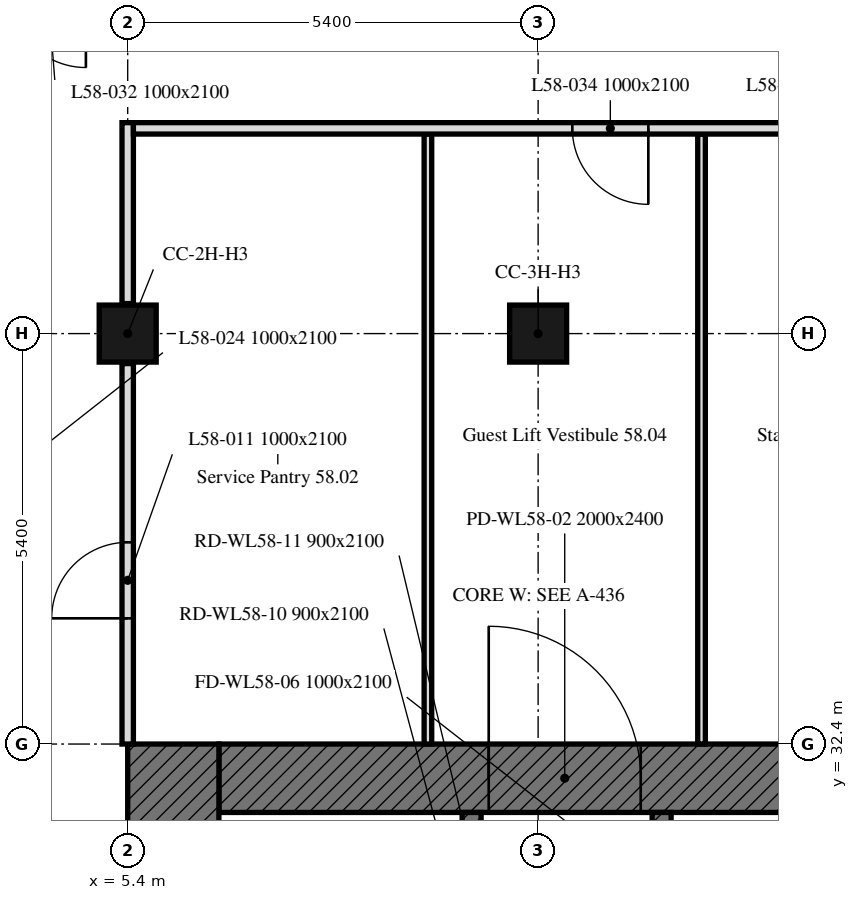
"""IFC4 building model, lengths in metres.
Left out: names, types, materials, properties, quantities, classifications, styles, units other than length and angle.
Written with IfcOpenShell. Run it as: python <this file> out.ifc"""

import sys

from ifc_helpers import new_model, si_unit, direction, frame, frame_2d, origin, origin_2d, place, context, subcontext, project, spatial, rectangle, extrude, element, fill, save


model = new_model("IFC4")
c1 = context("Model", 3, precision=1e-05, world=origin(), true_north=direction((0.0, 1.0)))
c2 = subcontext(c1, "Body", "Model", "MODEL_VIEW")
j1 = project(units=[si_unit("LENGTHUNIT", "METRE"), si_unit("PLANEANGLEUNIT", "RADIAN")], contexts=[c1])
p1 = place(None, origin())
s1 = spatial("IfcSite", under=j1, at=p1, CompositionType="ELEMENT")
p2 = place(p1, origin())
s2 = spatial("IfcBuilding", under=s1, at=p2, CompositionType="ELEMENT")
p3 = place(p2, frame((0.0, 0.0, 230.2)))
s3 = spatial("IfcBuildingStorey", under=s2, at=p3, CompositionType="ELEMENT", Elevation=230.2)
for number, where, z_axis, x_axis in (
    (1, (5.4, 37.8, 0.0), (0.0, 0.0, 1.0), (1.0, 0.0, 0.0)),
    (2, (10.8, 37.8, 0.0), (0.0, 0.0, 1.0), (1.0, 0.0, 0.0)),
):
    element("IfcColumn", number, at=place(p3, frame(where, z_axis=z_axis, x_axis=x_axis)), inside=s3, PredefinedType="COLUMN", context=c2, shape_type="SweptSolid", body=[
        extrude(rectangle(XDim=0.75, YDim=0.75, at=origin_2d()), origin(), (0.0, 0.0, 1.0), 2.8),
    ])
p4 = place(p3, frame((6.6, 31.95, 0.0), z_axis=(0.0, 0.0, 1.0), x_axis=(1.0, 0.0, 0.0)))
e3 = element("IfcWall", 3, at=p4, inside=s3, PredefinedType="SOLIDWALL", context=c2, shape_type="SweptSolid", body=[
    extrude(rectangle(XDim=11.1, YDim=0.9, at=frame_2d((5.55, 0.0))), origin(), (0.0, 0.0, 1.0), 2.8),
])
p5 = place(p4, frame((3.55, 0.0, 0.0)))
e4 = element("IfcOpeningElement", 4, at=p5, cuts=e3, PredefinedType="OPENING", context=c2, shape_type="SweptSolid", body=[
    extrude(rectangle(XDim=2.0, YDim=2.4, at=frame_2d((1.0, 1.2))), frame((0.0, 0.45, 0.0), z_axis=(0.0, -1.0, 0.0), x_axis=(1.0, 0.0, 0.0)), (0.0, 0.0, 1.0), 0.9),
])
p6 = place(p3, frame((6.0, 16.2, 0.0), z_axis=(0.0, 0.0, 1.0), x_axis=(0.0, 1.0, 0.0)))
e5 = element("IfcWall", 5, at=p6, inside=s3, PredefinedType="SOLIDWALL", context=c2, shape_type="SweptSolid", body=[
    extrude(rectangle(XDim=16.2, YDim=1.2, at=frame_2d((8.1, 0.0))), origin(), (0.0, 0.0, 1.0), 2.8),
])
p7 = place(p3, frame((9.925, 17.1, 0.0), z_axis=(0.0, 0.0, 1.0), x_axis=(0.0, 1.0, 0.0)))
e6 = element("IfcWall", 6, at=p7, inside=s3, PredefinedType="SOLIDWALL", context=c2, shape_type="SweptSolid", body=[
    extrude(rectangle(XDim=14.4, YDim=0.25, at=frame_2d((7.2, 0.0))), origin(), (0.0, 0.0, 1.0), 2.8),
])
p8 = place(p7, frame((4.6, 0.0, 0.0)))
e7 = element("IfcOpeningElement", 7, at=p8, cuts=e6, PredefinedType="OPENING", context=c2, shape_type="SweptSolid", body=[
    extrude(rectangle(XDim=1.0, YDim=2.1, at=frame_2d((0.5, 1.05))), frame((0.0, 0.125, 0.0), z_axis=(0.0, -1.0, 0.0), x_axis=(1.0, 0.0, 0.0)), (0.0, 0.0, 1.0), 0.25),
])
p9 = place(p7, frame((7.062, 0.0, 0.0)))
e8 = element("IfcOpeningElement", 8, at=p9, cuts=e6, PredefinedType="OPENING", context=c2, shape_type="SweptSolid", body=[
    extrude(rectangle(XDim=1.2, YDim=2.1, at=frame_2d((0.6, 1.05))), frame((0.0, 0.125, 0.0), z_axis=(0.0, -1.0, 0.0), x_axis=(1.0, 0.0, 0.0)), (0.0, 0.0, 1.0), 0.25),
])
p10 = place(p7, frame((10.106, 0.0, 0.0)))
e9 = element("IfcOpeningElement", 9, at=p10, cuts=e6, PredefinedType="OPENING", context=c2, shape_type="SweptSolid", body=[
    extrude(rectangle(XDim=0.9, YDim=2.1, at=frame_2d((0.45, 1.05))), frame((0.0, 0.125, 0.0), z_axis=(0.0, -1.0, 0.0), x_axis=(1.0, 0.0, 0.0)), (0.0, 0.0, 1.0), 0.25),
])
p11 = place(p7, frame((12.048, 0.0, 0.0)))
e10 = element("IfcOpeningElement", 10, at=p11, cuts=e6, PredefinedType="OPENING", context=c2, shape_type="SweptSolid", body=[
    extrude(rectangle(XDim=0.9, YDim=2.1, at=frame_2d((0.45, 1.05))), frame((0.0, 0.125, 0.0), z_axis=(0.0, -1.0, 0.0), x_axis=(1.0, 0.0, 0.0)), (0.0, 0.0, 1.0), 0.25),
])
p12 = place(p7, frame((13.354, 0.0, 0.0)))
e11 = element("IfcOpeningElement", 11, at=p12, cuts=e6, PredefinedType="OPENING", context=c2, shape_type="SweptSolid", body=[
    extrude(rectangle(XDim=0.9, YDim=2.1, at=frame_2d((0.45, 1.05))), frame((0.0, 0.125, 0.0), z_axis=(0.0, -1.0, 0.0), x_axis=(1.0, 0.0, 0.0)), (0.0, 0.0, 1.0), 0.25),
])
p13 = place(p3, frame((12.425, 29.4, 0.0), z_axis=(0.0, 0.0, 1.0), x_axis=(0.0, 1.0, 0.0)))
e12 = element("IfcWall", 12, at=p13, inside=s3, PredefinedType="SOLIDWALL", context=c2, shape_type="SweptSolid", body=[
    extrude(rectangle(XDim=2.1, YDim=0.25, at=frame_2d((1.05, 0.0))), origin(), (0.0, 0.0, 1.0), 2.8),
])
p14 = place(p13, frame((0.5, 0.0, 0.0)))
e13 = element("IfcOpeningElement", 13, at=p14, cuts=e12, PredefinedType="OPENING", context=c2, shape_type="SweptSolid", body=[
    extrude(rectangle(XDim=1.0, YDim=2.1, at=frame_2d((0.5, 1.05))), frame((0.0, 0.125, 0.0), z_axis=(0.0, -1.0, 0.0), x_axis=(1.0, 0.0, 0.0)), (0.0, 0.0, 1.0), 0.25),
])
for number, where, z_axis, x_axis in (
    (14, (12.95, 32.4, 0.0), (0.0, 0.0, 1.0), (0.0, 1.0, 0.0)),
    (15, (9.35, 40.425, 0.0), (0.0, 0.0, 1.0), (0.0, -1.0, 0.0)),
):
    element("IfcWall", number, at=place(p3, frame(where, z_axis=z_axis, x_axis=x_axis)), inside=s3, PredefinedType="PARTITIONING", context=c2, shape_type="SweptSolid", body=[
        extrude(rectangle(XDim=8.025, YDim=0.1, at=frame_2d((4.013, 0.0))), origin(), (0.0, 0.0, 1.0), 2.2),
    ])
p15 = place(p3, frame((5.4, 32.4, 0.0), z_axis=(0.0, 0.0, 1.0), x_axis=(0.0, 1.0, 0.0)))
e16 = element("IfcWall", 16, at=p15, inside=s3, PredefinedType="PARTITIONING", context=c2, shape_type="SweptSolid", body=[
    extrude(rectangle(XDim=5.005, YDim=0.15, at=frame_2d((2.502, 0.0))), origin(), (0.0, 0.0, 1.0), 2.8),
])
p16 = place(p15, frame((1.654, 0.0, 0.0)))
e17 = element("IfcOpeningElement", 17, at=p16, cuts=e16, PredefinedType="OPENING", context=c2, shape_type="SweptSolid", body=[
    extrude(rectangle(XDim=1.0, YDim=2.1, at=frame_2d((0.5, 1.05))), frame((0.0, 0.075, 0.0), z_axis=(0.0, -1.0, 0.0), x_axis=(1.0, 0.0, 0.0)), (0.0, 0.0, 1.0), 0.15),
])
p17 = place(p3, frame((5.4, 38.195, 0.0), z_axis=(0.0, 0.0, 1.0), x_axis=(0.0, 1.0, 0.0)))
e18 = element("IfcWall", 18, at=p17, inside=s3, PredefinedType="PARTITIONING", context=c2, shape_type="SweptSolid", body=[
    extrude(rectangle(XDim=2.38, YDim=0.15, at=frame_2d((1.19, 0.0))), origin(), (0.0, 0.0, 1.0), 2.8),
])
p18 = place(p3, frame((42.449, 40.5, 0.0), z_axis=(0.0, 0.0, 1.0), x_axis=(-1.0, 0.0, 0.0)))
e19 = element("IfcWall", 19, at=p18, inside=s3, PredefinedType="PARTITIONING", context=c2, shape_type="SweptSolid", body=[
    extrude(rectangle(XDim=36.974, YDim=0.15, at=frame_2d((18.487, 0.0))), origin(), (0.0, 0.0, 1.0), 2.2),
])
p19 = place(p18, frame((17.649, 0.0, 0.0)))
e20 = element("IfcOpeningElement", 20, at=p19, cuts=e19, PredefinedType="OPENING", context=c2, shape_type="SweptSolid", body=[
    extrude(rectangle(XDim=1.0, YDim=2.1, at=frame_2d((0.5, 1.05))), frame((0.0, 0.075, 0.0), z_axis=(0.0, -1.0, 0.0), x_axis=(1.0, 0.0, 0.0)), (0.0, 0.0, 1.0), 0.15),
])
p20 = place(p18, frame((2.029, 0.0, 0.0)))
e21 = element("IfcOpeningElement", 21, at=p20, cuts=e19, PredefinedType="OPENING", context=c2, shape_type="SweptSolid", body=[
    extrude(rectangle(XDim=1.0, YDim=2.1, at=frame_2d((0.5, 1.05))), frame((0.0, 0.075, 0.0), z_axis=(0.0, -1.0, 0.0), x_axis=(1.0, 0.0, 0.0)), (0.0, 0.0, 1.0), 0.15),
])
p21 = place(p18, frame((27.374, 0.0, 0.0)))
e22 = element("IfcOpeningElement", 22, at=p21, cuts=e19, PredefinedType="OPENING", context=c2, shape_type="SweptSolid", body=[
    extrude(rectangle(XDim=1.0, YDim=2.1, at=frame_2d((0.5, 1.05))), frame((0.0, 0.075, 0.0), z_axis=(0.0, -1.0, 0.0), x_axis=(1.0, 0.0, 0.0)), (0.0, 0.0, 1.0), 0.15),
])
p22 = place(p18, frame((7.924, 0.0, 0.0)))
e23 = element("IfcOpeningElement", 23, at=p22, cuts=e19, PredefinedType="OPENING", context=c2, shape_type="SweptSolid", body=[
    extrude(rectangle(XDim=1.0, YDim=2.1, at=frame_2d((0.5, 1.05))), frame((0.0, 0.075, 0.0), z_axis=(0.0, -1.0, 0.0), x_axis=(1.0, 0.0, 0.0)), (0.0, 0.0, 1.0), 0.15),
])
p23 = place(p18, frame((4.699, 0.0, 0.0)))
e24 = element("IfcOpeningElement", 24, at=p23, cuts=e19, PredefinedType="OPENING", context=c2, shape_type="SweptSolid", body=[
    extrude(rectangle(XDim=1.8, YDim=2.4, at=frame_2d((0.9, 1.2))), frame((0.0, 0.075, 0.0), z_axis=(0.0, -1.0, 0.0), x_axis=(1.0, 0.0, 0.0)), (0.0, 0.0, 1.0), 0.15),
])
p24 = place(p18, frame((30.199, 0.0, 0.0)))
e25 = element("IfcOpeningElement", 25, at=p24, cuts=e19, PredefinedType="OPENING", context=c2, shape_type="SweptSolid", body=[
    extrude(rectangle(XDim=1.0, YDim=2.1, at=frame_2d((0.5, 1.05))), frame((0.0, 0.075, 0.0), z_axis=(0.0, -1.0, 0.0), x_axis=(1.0, 0.0, 0.0)), (0.0, 0.0, 1.0), 0.15),
])
p25 = place(p5, origin())
e26 = element("IfcDoor", 26, at=p25, inside=s3, OperationType="DOUBLE_DOOR_SINGLE_SWING", PredefinedType="DOOR", context=c2, shape_type="SweptSolid", body=[
    extrude(rectangle(XDim=2.0, YDim=2.4, at=frame_2d((1.0, 1.2))), frame((0.0, 0.025, 0.0), z_axis=(0.0, -1.0, 0.0), x_axis=(1.0, 0.0, 0.0)), (0.0, 0.0, 1.0), 0.05),
])
fill(e4, e26)
p26 = place(p16, origin())
e27 = element("IfcDoor", 27, at=p26, inside=s3, OperationType="SINGLE_SWING_RIGHT", PredefinedType="DOOR", context=c2, shape_type="SweptSolid", body=[
    extrude(rectangle(XDim=1.0, YDim=2.1, at=frame_2d((0.5, 1.05))), frame((0.0, 0.025, 0.0), z_axis=(0.0, -1.0, 0.0), x_axis=(1.0, 0.0, 0.0)), (0.0, 0.0, 1.0), 0.05),
])
fill(e17, e27)
p27 = place(p24, origin())
e28 = element("IfcDoor", 28, at=p27, inside=s3, OperationType="SINGLE_SWING_LEFT", PredefinedType="DOOR", context=c2, shape_type="SweptSolid", body=[
    extrude(rectangle(XDim=1.0, YDim=2.1, at=frame_2d((0.5, 1.05))), frame((0.0, 0.025, 0.0), z_axis=(0.0, -1.0, 0.0), x_axis=(1.0, 0.0, 0.0)), (0.0, 0.0, 1.0), 0.05),
])
fill(e25, e28)
save(model, sys.argv[1])
